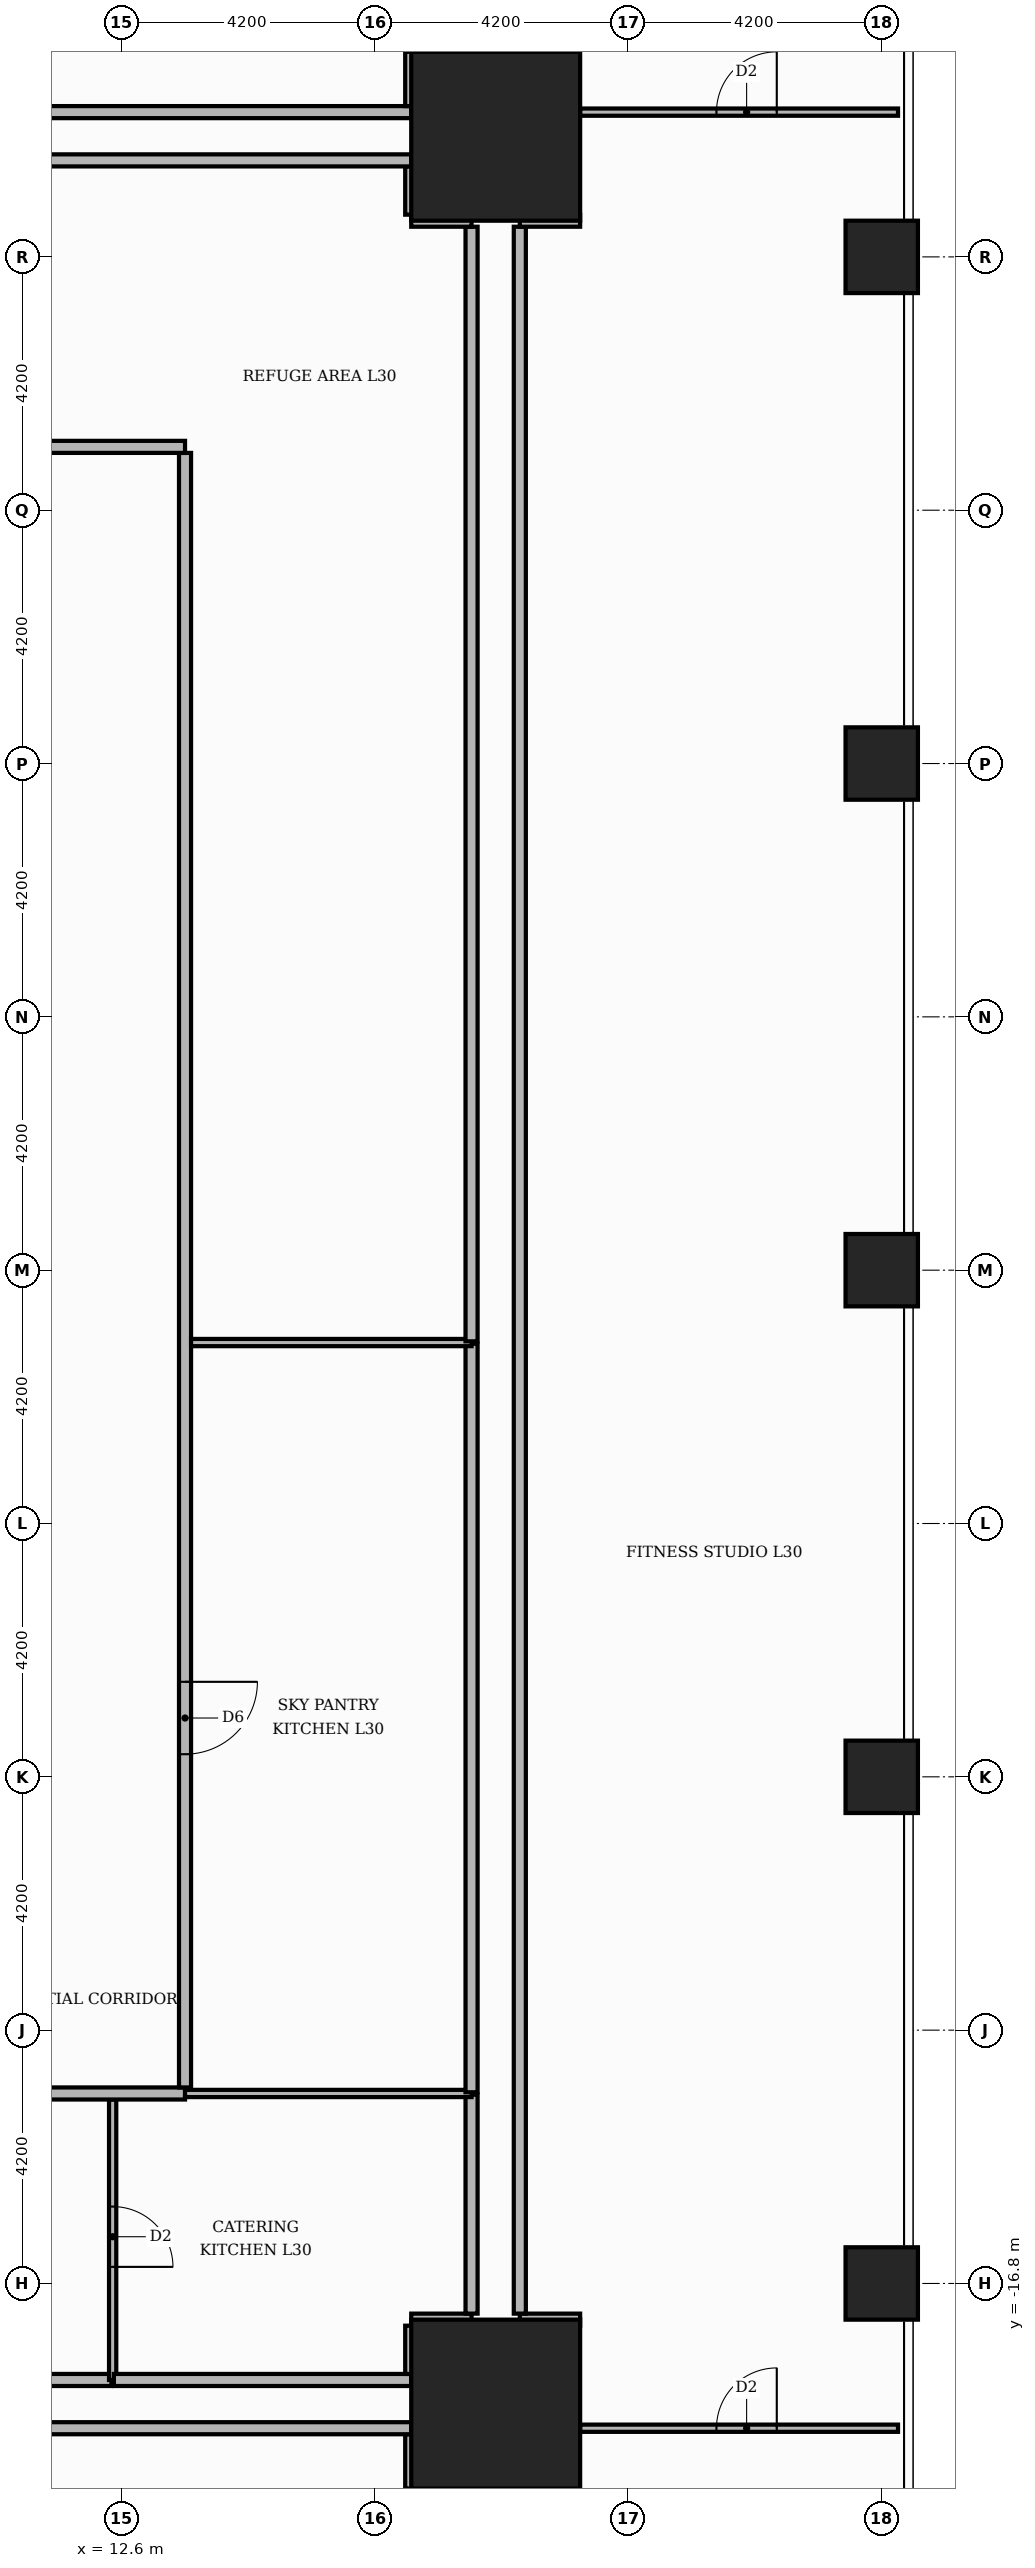
"""IFC4 building model, lengths in metres.
Left out: names, types, materials, properties, quantities, classifications, styles, units other than length and angle.
Written with IfcOpenShell. Run it as: python <this file> out.ifc"""

import sys

from ifc_helpers import new_model, si_unit, direction, frame, frame_2d, origin, origin_2d, place, context, subcontext, project, spatial, rectangle, extrude, element, fill, save


model = new_model("IFC4")
c1 = context("Model", 3, precision=1e-05, world=origin(), true_north=direction((0.0, 1.0)))
c2 = subcontext(c1, "Body", "Model", "MODEL_VIEW")
j1 = project(units=[si_unit("LENGTHUNIT", "METRE"), si_unit("PLANEANGLEUNIT", "RADIAN")], contexts=[c1])
p1 = place(None, origin())
s1 = spatial("IfcSite", under=j1, at=p1, CompositionType="ELEMENT")
p2 = place(p1, origin())
s2 = spatial("IfcBuilding", under=s1, at=p2, CompositionType="ELEMENT")
p3 = place(p2, frame((0.0, 0.0, 126.0)))
s3 = spatial("IfcBuildingStorey", under=s2, at=p3, CompositionType="ELEMENT", Elevation=126.0)
for number, where, z_axis, x_axis in (
    (1, (18.8, 18.8, 0.0), (0.0, 0.0, 1.0), (1.0, 0.0, 0.0)),
    (2, (18.8, -18.8, 0.0), (0.0, 0.0, 1.0), (1.0, 0.0, 0.0)),
):
    element("IfcColumn", number, at=place(p3, frame(where, z_axis=z_axis, x_axis=x_axis)), inside=s3, PredefinedType="COLUMN", context=c2, shape_type="SweptSolid", body=[
        extrude(rectangle(XDim=2.8, YDim=2.8, at=origin_2d()), origin(), (0.0, 0.0, 1.0), 7.8),
    ])
for number, where, z_axis, x_axis in (
    (3, (25.2, 0.0, 0.0), (0.0, 0.0, 1.0), (1.0, 0.0, 0.0)),
    (4, (25.2, 8.4, 0.0), (0.0, 0.0, 1.0), (1.0, 0.0, 0.0)),
    (5, (25.2, 16.8, 0.0), (0.0, 0.0, 1.0), (1.0, 0.0, 0.0)),
    (6, (25.2, -8.4, 0.0), (0.0, 0.0, 1.0), (1.0, 0.0, 0.0)),
    (7, (25.2, -16.8, 0.0), (0.0, 0.0, 1.0), (1.0, 0.0, 0.0)),
):
    element("IfcColumn", number, at=place(p3, frame(where, z_axis=z_axis, x_axis=x_axis)), inside=s3, PredefinedType="COLUMN", context=c2, shape_type="SweptSolid", body=[
        extrude(rectangle(XDim=1.2, YDim=1.2, at=origin_2d()), origin(), (0.0, 0.0, 1.0), 7.8),
    ])
p4 = place(p3, frame((17.4, -20.2, 0.0), z_axis=(0.0, 0.0, 1.0), x_axis=(0.0, 1.0, 0.0)))
e8 = element("IfcWall", 8, at=p4, inside=s3, PredefinedType="PARTITIONING", context=c2, shape_type="SweptSolid", body=[
    extrude(rectangle(XDim=0.9, YDim=0.2, at=frame_2d((0.45, 0.0))), origin(), (0.0, 0.0, 1.0), 7.38),
])
p5 = place(p3, frame((-17.4, -19.2, 0.0), z_axis=(0.0, 0.0, 1.0), x_axis=(1.0, 0.0, 0.0)))
e9 = element("IfcWall", 9, at=p5, inside=s3, PredefinedType="PARTITIONING", context=c2, shape_type="SweptSolid", body=[
    extrude(rectangle(XDim=34.8, YDim=0.2, at=frame_2d((17.4, 0.0))), origin(), (0.0, 0.0, 1.0), 7.38),
])
p6 = place(p5, frame((16.8, 0.0, 0.0)))
e10 = element("IfcOpeningElement", 10, at=p6, cuts=e9, PredefinedType="OPENING", context=c2, shape_type="SweptSolid", body=[
    extrude(rectangle(XDim=1.2, YDim=2.1, at=frame_2d((0.6, 1.05))), frame((0.0, 0.11, 0.0), z_axis=(0.0, -1.0, 0.0), x_axis=(1.0, 0.0, 0.0)), (0.0, 0.0, 1.0), 0.22),
])
p7 = place(p3, frame((20.2, -19.2, 0.0), z_axis=(0.0, 0.0, 1.0), x_axis=(1.0, 0.0, 0.0)))
e11 = element("IfcWall", 11, at=p7, inside=s3, PredefinedType="PARTITIONING", context=c2, shape_type="SweptSolid", body=[
    extrude(rectangle(XDim=5.27, YDim=0.12, at=frame_2d((2.635, 0.0))), origin(), (0.0, 0.0, 1.0), 7.38),
])
p8 = place(p7, frame((2.26, 0.0, 0.0)))
e12 = element("IfcOpeningElement", 12, at=p8, cuts=e11, PredefinedType="OPENING", context=c2, shape_type="SweptSolid", body=[
    extrude(rectangle(XDim=1.0, YDim=2.1, at=frame_2d((0.5, 1.05))), frame((0.0, 0.07, 0.0), z_axis=(0.0, -1.0, 0.0), x_axis=(1.0, 0.0, 0.0)), (0.0, 0.0, 1.0), 0.14),
])
p9 = place(p3, frame((1.07, -18.4, 0.0), z_axis=(0.0, 0.0, 1.0), x_axis=(1.0, 0.0, 0.0)))
e13 = element("IfcWall", 13, at=p9, inside=s3, PredefinedType="PARTITIONING", context=c2, shape_type="SweptSolid", body=[
    extrude(rectangle(XDim=11.36, YDim=0.2, at=frame_2d((5.68, 0.0))), origin(), (0.0, 0.0, 1.0), 7.38),
])
p10 = place(p3, frame((12.45, -18.4, 0.0), z_axis=(0.0, 0.0, 1.0), x_axis=(0.0, 1.0, 0.0)))
e14 = element("IfcWall", 14, at=p10, inside=s3, PredefinedType="PARTITIONING", context=c2, shape_type="SweptSolid", body=[
    extrude(rectangle(XDim=4.65, YDim=0.12, at=frame_2d((2.325, 0.0))), origin(), (0.0, 0.0, 1.0), 7.38),
])
p11 = place(p10, frame((1.875, 0.0, 0.0)))
e15 = element("IfcOpeningElement", 15, at=p11, cuts=e14, PredefinedType="OPENING", context=c2, shape_type="SweptSolid", body=[
    extrude(rectangle(XDim=1.0, YDim=2.1, at=frame_2d((0.5, 1.05))), frame((0.0, 0.07, 0.0), z_axis=(0.0, -1.0, 0.0), x_axis=(1.0, 0.0, 0.0)), (0.0, 0.0, 1.0), 0.14),
])
p12 = place(p3, frame((12.47, -18.4, 0.0), z_axis=(0.0, 0.0, 1.0), x_axis=(1.0, 0.0, 0.0)))
e16 = element("IfcWall", 16, at=p12, inside=s3, PredefinedType="PARTITIONING", context=c2, shape_type="SweptSolid", body=[
    extrude(rectangle(XDim=4.93, YDim=0.2, at=frame_2d((2.465, 0.0))), origin(), (0.0, 0.0, 1.0), 7.38),
])
p13 = place(p3, frame((17.4, -18.3, 0.0), z_axis=(0.0, 0.0, 1.0), x_axis=(0.0, 1.0, 0.0)))
e17 = element("IfcWall", 17, at=p13, inside=s3, PredefinedType="PARTITIONING", context=c2, shape_type="SweptSolid", body=[
    extrude(rectangle(XDim=0.8, YDim=0.2, at=frame_2d((0.4, 0.0))), origin(), (0.0, 0.0, 1.0), 7.38),
])
for number, where, z_axis, x_axis in (
    (18, (17.4, -17.4, 0.0), (0.0, 0.0, 1.0), (1.0, 0.0, 0.0)),
    (19, (19.2, -17.4, 0.0), (0.0, 0.0, 1.0), (1.0, 0.0, 0.0)),
):
    element("IfcWall", number, at=place(p3, frame(where, z_axis=z_axis, x_axis=x_axis)), inside=s3, PredefinedType="PARTITIONING", context=c2, shape_type="SweptSolid", body=[
        extrude(rectangle(XDim=1.0, YDim=0.2, at=frame_2d((0.5, 0.0))), origin(), (0.0, 0.0, 1.0), 7.38),
    ])
p14 = place(p3, frame((18.4, -17.3, 0.0), z_axis=(0.0, 0.0, 1.0), x_axis=(0.0, 1.0, 0.0)))
e20 = element("IfcWall", 20, at=p14, inside=s3, PredefinedType="PARTITIONING", context=c2, shape_type="SweptSolid", body=[
    extrude(rectangle(XDim=3.63, YDim=0.2, at=frame_2d((1.815, 0.0))), origin(), (0.0, 0.0, 1.0), 7.38),
])
p15 = place(p3, frame((19.2, -17.3, 0.0), z_axis=(0.0, 0.0, 1.0), x_axis=(0.0, 1.0, 0.0)))
e21 = element("IfcWall", 21, at=p15, inside=s3, PredefinedType="PARTITIONING", context=c2, shape_type="SweptSolid", body=[
    extrude(rectangle(XDim=34.6, YDim=0.2, at=frame_2d((17.3, 0.0))), origin(), (0.0, 0.0, 1.0), 7.38),
])
p16 = place(p3, frame((1.05, -13.65, 0.0), z_axis=(0.0, 0.0, 1.0), x_axis=(1.0, 0.0, 0.0)))
e22 = element("IfcWall", 22, at=p16, inside=s3, PredefinedType="PARTITIONING", context=c2, shape_type="SweptSolid", body=[
    extrude(rectangle(XDim=12.6, YDim=0.2, at=frame_2d((6.3, 0.0))), origin(), (0.0, 0.0, 1.0), 7.38),
])
p17 = place(p3, frame((13.65, -13.65, 0.0), z_axis=(0.0, 0.0, 1.0), x_axis=(1.0, 0.0, 0.0)))
e23 = element("IfcWall", 23, at=p17, inside=s3, PredefinedType="PARTITIONING", context=c2, shape_type="SweptSolid", body=[
    extrude(rectangle(XDim=4.75, YDim=0.12, at=frame_2d((2.375, 0.0))), origin(), (0.0, 0.0, 1.0), 7.38),
])
p18 = place(p3, frame((18.4, -13.63, 0.0), z_axis=(0.0, 0.0, 1.0), x_axis=(0.0, 1.0, 0.0)))
e24 = element("IfcWall", 24, at=p18, inside=s3, PredefinedType="PARTITIONING", context=c2, shape_type="SweptSolid", body=[
    extrude(rectangle(XDim=12.41, YDim=0.2, at=frame_2d((6.205, 0.0))), origin(), (0.0, 0.0, 1.0), 7.38),
])
p19 = place(p3, frame((13.65, -13.55, 0.0), z_axis=(0.0, 0.0, 1.0), x_axis=(0.0, 1.0, 0.0)))
e25 = element("IfcWall", 25, at=p19, inside=s3, PredefinedType="PARTITIONING", context=c2, shape_type="SweptSolid", body=[
    extrude(rectangle(XDim=27.1, YDim=0.2, at=frame_2d((13.55, 0.0))), origin(), (0.0, 0.0, 1.0), 7.38),
])
p20 = place(p19, frame((5.525, 0.0, 0.0)))
e26 = element("IfcOpeningElement", 26, at=p20, cuts=e25, PredefinedType="OPENING", context=c2, shape_type="SweptSolid", body=[
    extrude(rectangle(XDim=1.2, YDim=2.1, at=frame_2d((0.6, 1.05))), frame((0.0, 0.11, 0.0), z_axis=(0.0, -1.0, 0.0), x_axis=(1.0, 0.0, 0.0)), (0.0, 0.0, 1.0), 0.22),
])
p21 = place(p3, frame((13.75, -1.2, 0.0), z_axis=(0.0, 0.0, 1.0), x_axis=(1.0, 0.0, 0.0)))
e27 = element("IfcWall", 27, at=p21, inside=s3, PredefinedType="PARTITIONING", context=c2, shape_type="SweptSolid", body=[
    extrude(rectangle(XDim=4.65, YDim=0.12, at=frame_2d((2.325, 0.0))), origin(), (0.0, 0.0, 1.0), 7.38),
])
p22 = place(p3, frame((18.4, -1.18, 0.0), z_axis=(0.0, 0.0, 1.0), x_axis=(0.0, 1.0, 0.0)))
e28 = element("IfcWall", 28, at=p22, inside=s3, PredefinedType="PARTITIONING", context=c2, shape_type="SweptSolid", body=[
    extrude(rectangle(XDim=18.48, YDim=0.2, at=frame_2d((9.24, 0.0))), origin(), (0.0, 0.0, 1.0), 7.38),
])
p23 = place(p3, frame((-13.65, 13.65, 0.0), z_axis=(0.0, 0.0, 1.0), x_axis=(1.0, 0.0, 0.0)))
e29 = element("IfcWall", 29, at=p23, inside=s3, PredefinedType="PARTITIONING", context=c2, shape_type="SweptSolid", body=[
    extrude(rectangle(XDim=27.3, YDim=0.2, at=frame_2d((13.65, 0.0))), origin(), (0.0, 0.0, 1.0), 7.38),
])
p24 = place(p23, frame((13.05, 0.0, 0.0)))
e30 = element("IfcOpeningElement", 30, at=p24, cuts=e29, PredefinedType="OPENING", context=c2, shape_type="SweptSolid", body=[
    extrude(rectangle(XDim=1.2, YDim=2.1, at=frame_2d((0.6, 1.05))), frame((0.0, 0.11, 0.0), z_axis=(0.0, -1.0, 0.0), x_axis=(1.0, 0.0, 0.0)), (0.0, 0.0, 1.0), 0.22),
])
for number, where, z_axis, x_axis in (
    (31, (17.4, 17.4, 0.0), (0.0, 0.0, 1.0), (1.0, 0.0, 0.0)),
    (32, (19.2, 17.4, 0.0), (0.0, 0.0, 1.0), (1.0, 0.0, 0.0)),
):
    element("IfcWall", number, at=place(p3, frame(where, z_axis=z_axis, x_axis=x_axis)), inside=s3, PredefinedType="PARTITIONING", context=c2, shape_type="SweptSolid", body=[
        extrude(rectangle(XDim=1.0, YDim=0.2, at=frame_2d((0.5, 0.0))), origin(), (0.0, 0.0, 1.0), 7.38),
    ])
p25 = place(p3, frame((17.4, 17.5, 0.0), z_axis=(0.0, 0.0, 1.0), x_axis=(0.0, 1.0, 0.0)))
e33 = element("IfcWall", 33, at=p25, inside=s3, PredefinedType="PARTITIONING", context=c2, shape_type="SweptSolid", body=[
    extrude(rectangle(XDim=0.8, YDim=0.2, at=frame_2d((0.4, 0.0))), origin(), (0.0, 0.0, 1.0), 7.38),
])
for number, where, z_axis, x_axis in (
    (34, (-17.4, 18.4, 0.0), (0.0, 0.0, 1.0), (1.0, 0.0, 0.0)),
    (35, (-17.4, 19.2, 0.0), (0.0, 0.0, 1.0), (1.0, 0.0, 0.0)),
):
    element("IfcWall", number, at=place(p3, frame(where, z_axis=z_axis, x_axis=x_axis)), inside=s3, PredefinedType="PARTITIONING", context=c2, shape_type="SweptSolid", body=[
        extrude(rectangle(XDim=34.8, YDim=0.2, at=frame_2d((17.4, 0.0))), origin(), (0.0, 0.0, 1.0), 7.38),
    ])
p26 = place(p3, frame((20.2, 19.2, 0.0), z_axis=(0.0, 0.0, 1.0), x_axis=(1.0, 0.0, 0.0)))
e36 = element("IfcWall", 36, at=p26, inside=s3, PredefinedType="PARTITIONING", context=c2, shape_type="SweptSolid", body=[
    extrude(rectangle(XDim=5.27, YDim=0.12, at=frame_2d((2.635, 0.0))), origin(), (0.0, 0.0, 1.0), 7.38),
])
p27 = place(p26, frame((2.26, 0.0, 0.0)))
e37 = element("IfcOpeningElement", 37, at=p27, cuts=e36, PredefinedType="OPENING", context=c2, shape_type="SweptSolid", body=[
    extrude(rectangle(XDim=1.0, YDim=2.1, at=frame_2d((0.5, 1.05))), frame((0.0, 0.07, 0.0), z_axis=(0.0, -1.0, 0.0), x_axis=(1.0, 0.0, 0.0)), (0.0, 0.0, 1.0), 0.14),
])
p28 = place(p3, frame((17.4, 19.3, 0.0), z_axis=(0.0, 0.0, 1.0), x_axis=(0.0, 1.0, 0.0)))
e38 = element("IfcWall", 38, at=p28, inside=s3, PredefinedType="PARTITIONING", context=c2, shape_type="SweptSolid", body=[
    extrude(rectangle(XDim=0.9, YDim=0.2, at=frame_2d((0.45, 0.0))), origin(), (0.0, 0.0, 1.0), 7.38),
])
p29 = place(p20, frame((1.2, 0.0, 0.0), z_axis=(0.0, 0.0, 1.0), x_axis=(-1.0, 0.0, 0.0)))
e39 = element("IfcDoor", 39, at=p29, inside=s3, OperationType="SINGLE_SWING_RIGHT", PredefinedType="DOOR", context=c2, shape_type="SweptSolid", body=[
    extrude(rectangle(XDim=1.2, YDim=2.1, at=frame_2d((0.6, 1.05))), frame((0.0, 0.025, 0.0), z_axis=(0.0, -1.0, 0.0), x_axis=(1.0, 0.0, 0.0)), (0.0, 0.0, 1.0), 0.05),
])
fill(e26, e39)
p30 = place(p11, frame((1.0, 0.0, 0.0), z_axis=(0.0, 0.0, 1.0), x_axis=(-1.0, 0.0, 0.0)))
e40 = element("IfcDoor", 40, at=p30, inside=s3, OperationType="SINGLE_SWING_LEFT", PredefinedType="DOOR", context=c2, shape_type="SweptSolid", body=[
    extrude(rectangle(XDim=1.0, YDim=2.1, at=frame_2d((0.5, 1.05))), frame((0.0, 0.025, 0.0), z_axis=(0.0, -1.0, 0.0), x_axis=(1.0, 0.0, 0.0)), (0.0, 0.0, 1.0), 0.05),
])
fill(e15, e40)
p31 = place(p8, origin())
e41 = element("IfcDoor", 41, at=p31, inside=s3, OperationType="SINGLE_SWING_RIGHT", PredefinedType="DOOR", context=c2, shape_type="SweptSolid", body=[
    extrude(rectangle(XDim=1.0, YDim=2.1, at=frame_2d((0.5, 1.05))), frame((0.0, 0.025, 0.0), z_axis=(0.0, -1.0, 0.0), x_axis=(1.0, 0.0, 0.0)), (0.0, 0.0, 1.0), 0.05),
])
fill(e12, e41)
p32 = place(p27, origin())
e42 = element("IfcDoor", 42, at=p32, inside=s3, OperationType="SINGLE_SWING_RIGHT", PredefinedType="DOOR", context=c2, shape_type="SweptSolid", body=[
    extrude(rectangle(XDim=1.0, YDim=2.1, at=frame_2d((0.5, 1.05))), frame((0.0, 0.025, 0.0), z_axis=(0.0, -1.0, 0.0), x_axis=(1.0, 0.0, 0.0)), (0.0, 0.0, 1.0), 0.05),
])
fill(e37, e42)
save(model, sys.argv[1])
